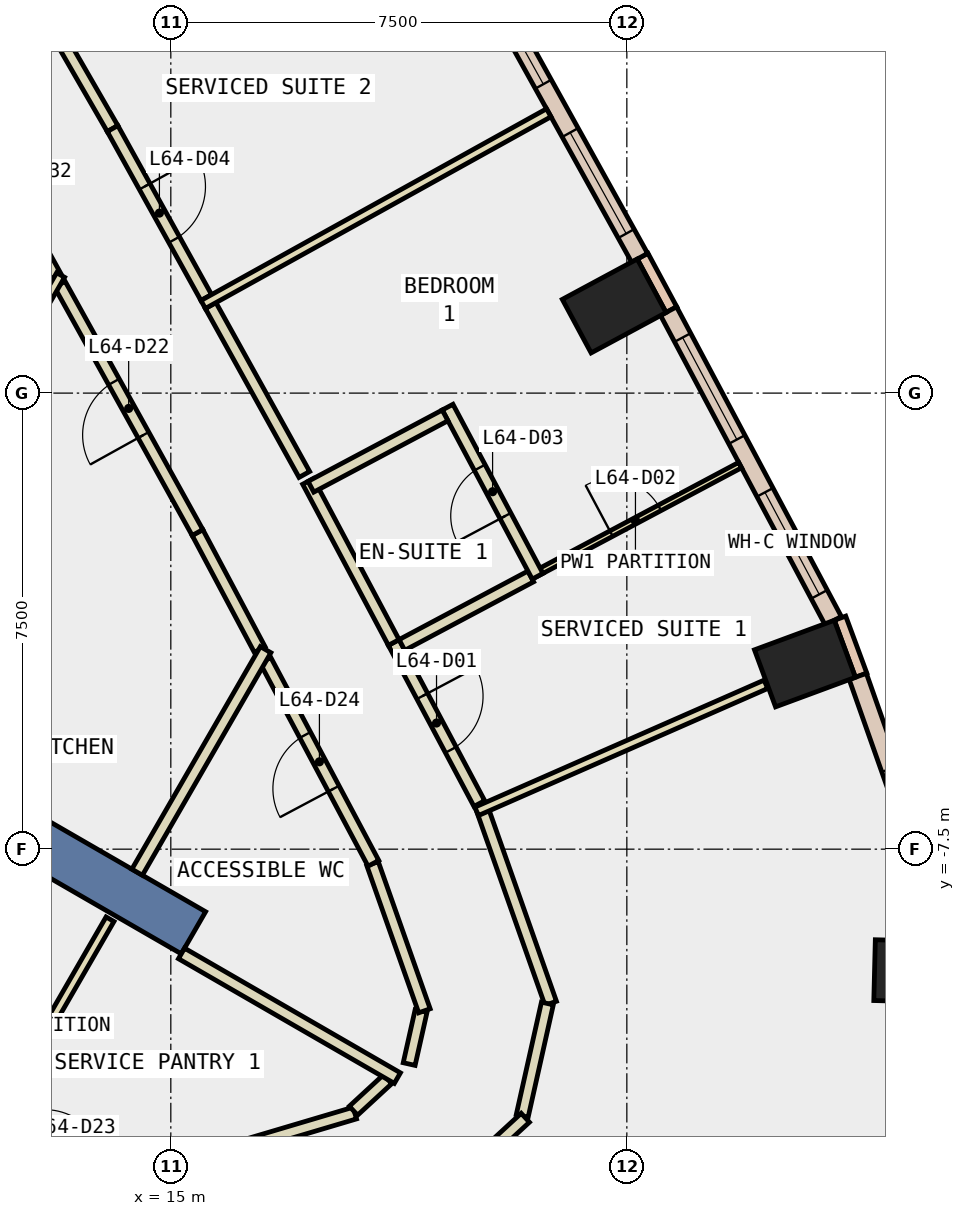
"""IFC4 building model, lengths in metres.
Left out: names, types, materials, properties, quantities, classifications, styles, units other than length and angle.
Written with IfcOpenShell. Run it as: python <this file> out.ifc"""

import sys

from ifc_helpers import new_model, si_unit, direction, frame, frame_2d, origin, origin_2d, place, context, subcontext, project, spatial, rectangle, extrude, element, fill, save


model = new_model("IFC4")
c1 = context("Model", 3, precision=1e-05, world=origin(), true_north=direction((0.0, 1.0)))
c2 = subcontext(c1, "Body", "Model", "MODEL_VIEW")
j1 = project(units=[si_unit("LENGTHUNIT", "METRE"), si_unit("PLANEANGLEUNIT", "RADIAN")], contexts=[c1])
p1 = place(None, origin())
s1 = spatial("IfcSite", under=j1, at=p1, CompositionType="ELEMENT")
p2 = place(p1, origin())
s2 = spatial("IfcBuilding", under=s1, at=p2, CompositionType="ELEMENT")
p3 = place(p2, frame((0.0, 0.0, 277.4)))
s3 = spatial("IfcBuildingStorey", under=s2, at=p3, CompositionType="ELEMENT", Elevation=277.4)
for number, where, z_axis, x_axis in (
    (1, (27.274, -9.507, -0.34), (0.0, 0.0, 1.0), (0.025, 1.0, 0.0)),
    (2, (25.429, -4.448, -0.34), (0.0, 0.0, 1.0), (-0.347, 0.938, 0.0)),
    (3, (22.292, 1.433, -0.34), (0.0, 0.0, 1.0), (-0.474, 0.881, 0.0)),
):
    element("IfcColumn", number, at=place(p3, frame(where, z_axis=z_axis, x_axis=x_axis)), inside=s3, PredefinedType="COLUMN", context=c2, shape_type="SweptSolid", body=[
        extrude(rectangle(XDim=1.0, YDim=1.4, at=origin_2d()), origin(), (0.0, 0.0, 1.0), 3.34),
    ])
p4 = place(p3, frame((7.578, -4.375, -0.34), z_axis=(0.0, 0.0, 1.0), x_axis=(0.866024315419, -0.5000018851, 0.0)))
e4 = element("IfcWall", 4, at=p4, inside=s3, PredefinedType="SHEAR", context=c2, shape_type="SweptSolid", body=[
    extrude(rectangle(XDim=9.0, YDim=0.8, at=frame_2d((4.5, 0.0))), origin(), (0.0, 0.0, 1.0), 3.34),
])
p5 = place(p3, frame((26.353, -4.64, 0.0), z_axis=(0.0, 0.0, 1.0), x_axis=(-0.346892928577, 0.937904737222, 0.0)))
e5 = element("IfcWall", 5, at=p5, inside=s3, PredefinedType="STANDARD", context=c2, shape_type="SweptSolid", body=[
    extrude(rectangle(XDim=1.0, YDim=0.2, at=frame_2d((0.5, 0.0))), origin(), (0.0, 0.0, 1.0), 3.0),
])
p6 = place(p3, frame((23.233, 1.372, 0.0), z_axis=(0.0, 0.0, 1.0), x_axis=(-0.473765014438, 0.880651299377, 0.0)))
e6 = element("IfcWall", 6, at=p6, inside=s3, PredefinedType="STANDARD", context=c2, shape_type="SweptSolid", body=[
    extrude(rectangle(XDim=1.0, YDim=0.2, at=frame_2d((0.5, 0.0))), origin(), (0.0, 0.0, 1.0), 3.0),
])
p7 = place(p3, frame((27.836, -9.021, 0.0), z_axis=(0.0, 0.0, 1.0), x_axis=(-0.332491532378, 0.943106240514, 0.0)))
e7 = element("IfcWall", 7, at=p7, inside=s3, PredefinedType="STANDARD", context=c2, shape_type="SweptSolid", body=[
    extrude(rectangle(XDim=4.625, YDim=0.3, at=frame_2d((2.312, 0.0))), origin(), (0.0, 0.0, 1.0), 3.0),
])
p8 = place(p7, frame((1.613, 0.0, 0.9)))
e8 = element("IfcOpeningElement", 8, at=p8, cuts=e7, PredefinedType="OPENING", context=c2, shape_type="SweptSolid", body=[
    extrude(rectangle(XDim=1.4, YDim=2.0, at=frame_2d((0.7, 1.0))), frame((0.0, 0.16, 0.0), z_axis=(0.0, -1.0, 0.0), x_axis=(1.0, 0.0, 0.0)), (0.0, 0.0, 1.0), 0.32),
])
p9 = place(p3, frame((25.895, -3.744, 0.0), z_axis=(0.0, 0.0, 1.0), x_axis=(-0.469691596427, 0.882830563724, 0.0)))
e9 = element("IfcWall", 9, at=p9, inside=s3, PredefinedType="STANDARD", context=c2, shape_type="SweptSolid", body=[
    extrude(rectangle(XDim=5.768, YDim=0.3, at=frame_2d((2.884, 0.0))), origin(), (0.0, 0.0, 1.0), 3.0),
])
p10 = place(p9, frame((0.492, 0.0, 0.9)))
e10 = element("IfcOpeningElement", 10, at=p10, cuts=e9, PredefinedType="OPENING", context=c2, shape_type="SweptSolid", body=[
    extrude(rectangle(XDim=1.9, YDim=2.0, at=frame_2d((0.95, 1.0))), frame((0.0, 0.16, 0.0), z_axis=(0.0, -1.0, 0.0), x_axis=(1.0, 0.0, 0.0)), (0.0, 0.0, 1.0), 0.32),
])
p11 = place(p9, frame((3.376, 0.0, 0.9)))
e11 = element("IfcOpeningElement", 11, at=p11, cuts=e9, PredefinedType="OPENING", context=c2, shape_type="SweptSolid", body=[
    extrude(rectangle(XDim=1.9, YDim=2.0, at=frame_2d((0.95, 1.0))), frame((0.0, 0.16, 0.0), z_axis=(0.0, -1.0, 0.0), x_axis=(1.0, 0.0, 0.0)), (0.0, 0.0, 1.0), 0.32),
])
p12 = place(p3, frame((22.71, 2.225, 0.0), z_axis=(0.0, 0.0, 1.0), x_axis=(-0.485049005017, 0.874486971162, 0.0)))
e12 = element("IfcWall", 12, at=p12, inside=s3, PredefinedType="STANDARD", context=c2, shape_type="SweptSolid", body=[
    extrude(rectangle(XDim=5.62, YDim=0.3, at=frame_2d((2.81, 0.0))), origin(), (0.0, 0.0, 1.0), 3.0),
])
p13 = place(p12, frame((0.455, 0.0, 0.9)))
e13 = element("IfcOpeningElement", 13, at=p13, cuts=e12, PredefinedType="OPENING", context=c2, shape_type="SweptSolid", body=[
    extrude(rectangle(XDim=1.9, YDim=2.0, at=frame_2d((0.95, 1.0))), frame((0.0, 0.16, 0.0), z_axis=(0.0, -1.0, 0.0), x_axis=(1.0, 0.0, 0.0)), (0.0, 0.0, 1.0), 0.32),
])
p14 = place(p12, frame((3.265, 0.0, 0.9)))
e14 = element("IfcOpeningElement", 14, at=p14, cuts=e12, PredefinedType="OPENING", context=c2, shape_type="SweptSolid", body=[
    extrude(rectangle(XDim=1.9, YDim=2.0, at=frame_2d((0.95, 1.0))), frame((0.0, 0.16, 0.0), z_axis=(0.0, -1.0, 0.0), x_axis=(1.0, 0.0, 0.0)), (0.0, 0.0, 1.0), 0.32),
])
p15 = place(p3, frame((13.102, 1.921, 0.0), z_axis=(0.0, 0.0, 1.0), x_axis=(-0.485065409582, 0.874477871891, 0.0)))
e15 = element("IfcWall", 15, at=p15, inside=s3, PredefinedType="PARTITIONING", context=c2, shape_type="SweptSolid", body=[
    extrude(rectangle(XDim=1.651, YDim=0.2, at=frame_2d((0.826, 0.0))), origin(), (0.0, 0.0, 1.0), 3.0),
])
p16 = place(p15, frame((0.325, 0.0, 0.0)))
e16 = element("IfcOpeningElement", 16, at=p16, cuts=e15, PredefinedType="OPENING", context=c2, shape_type="SweptSolid", body=[
    extrude(rectangle(XDim=1.0, YDim=2.1, at=frame_2d((0.5, 1.05))), frame((0.0, 0.11, 0.0), z_axis=(0.0, -1.0, 0.0), x_axis=(1.0, 0.0, 0.0)), (0.0, 0.0, 1.0), 0.22),
])
p17 = place(p3, frame((16.462, -4.217, 0.0), z_axis=(0.0, 0.0, 1.0), x_axis=(-0.469436447461, 0.882966263113, 0.0)))
e17 = element("IfcWall", 17, at=p17, inside=s3, PredefinedType="PARTITIONING", context=c2, shape_type="SweptSolid", body=[
    extrude(rectangle(XDim=2.179, YDim=0.2, at=frame_2d((1.09, 0.0))), origin(), (0.0, 0.0, 1.0), 3.0),
])
p18 = place(p3, frame((15.439, -2.293, 0.0), z_axis=(0.0, 0.0, 1.0), x_axis=(-0.485079003918, 0.874470331091, 0.0)))
e18 = element("IfcWall", 18, at=p18, inside=s3, PredefinedType="PARTITIONING", context=c2, shape_type="SweptSolid", body=[
    extrude(rectangle(XDim=4.669, YDim=0.2, at=frame_2d((2.334, 0.0))), origin(), (0.0, 0.0, 1.0), 3.0),
])
p19 = place(p18, frame((1.834, 0.0, 0.0)))
e19 = element("IfcOpeningElement", 19, at=p19, cuts=e18, PredefinedType="OPENING", context=c2, shape_type="SweptSolid", body=[
    extrude(rectangle(XDim=1.0, YDim=2.1, at=frame_2d((0.5, 1.05))), frame((0.0, 0.11, 0.0), z_axis=(0.0, -1.0, 0.0), x_axis=(1.0, 0.0, 0.0)), (0.0, 0.0, 1.0), 0.22),
])
p20 = place(p3, frame((15.177, -12.686, 0.0), z_axis=(0.0, 0.0, 1.0), x_axis=(0.958629704259, 0.284656090947, 0.0)))
e20 = element("IfcWall", 20, at=p20, inside=s3, PredefinedType="PARTITIONING", context=c2, shape_type="SweptSolid", body=[
    extrude(rectangle(XDim=2.972, YDim=0.2, at=frame_2d((1.486, 0.0))), origin(), (0.0, 0.0, 1.0), 3.0),
])
p21 = place(p3, frame((18.004, -11.801, 0.0), z_axis=(0.0, 0.0, 1.0), x_axis=(0.735268601872, 0.677775835436, 0.0)))
e21 = element("IfcWall", 21, at=p21, inside=s3, PredefinedType="PARTITIONING", context=c2, shape_type="SweptSolid", body=[
    extrude(rectangle(XDim=0.764, YDim=0.2, at=frame_2d((0.382, 0.0))), origin(), (0.0, 0.0, 1.0), 3.0),
])
p22 = place(p3, frame((18.92, -11.034, 0.0), z_axis=(0.0, 0.0, 1.0), x_axis=(0.219096654714, 0.975703159723, 0.0)))
e22 = element("IfcWall", 22, at=p22, inside=s3, PredefinedType="PARTITIONING", context=c2, shape_type="SweptSolid", body=[
    extrude(rectangle(XDim=0.895, YDim=0.2, at=frame_2d((0.447, 0.0))), origin(), (0.0, 0.0, 1.0), 3.0),
])
p23 = place(p3, frame((19.171, -10.158, 0.0), z_axis=(0.0, 0.0, 1.0), x_axis=(-0.332486504777, 0.943108012977, 0.0)))
e23 = element("IfcWall", 23, at=p23, inside=s3, PredefinedType="PARTITIONING", context=c2, shape_type="SweptSolid", body=[
    extrude(rectangle(XDim=2.565, YDim=0.2, at=frame_2d((1.282, 0.0))), origin(), (0.0, 0.0, 1.0), 3.0),
])
p24 = place(p3, frame((18.332, -7.733, 0.0), z_axis=(0.0, 0.0, 1.0), x_axis=(-0.469639737924, 0.882858152006, 0.0)))
e24 = element("IfcWall", 24, at=p24, inside=s3, PredefinedType="PARTITIONING", context=c2, shape_type="SweptSolid", body=[
    extrude(rectangle(XDim=3.782, YDim=0.2, at=frame_2d((1.891, 0.0))), origin(), (0.0, 0.0, 1.0), 3.0),
])
p25 = place(p24, frame((1.391, 0.0, 0.0)))
e25 = element("IfcOpeningElement", 25, at=p25, cuts=e24, PredefinedType="OPENING", context=c2, shape_type="SweptSolid", body=[
    extrude(rectangle(XDim=1.0, YDim=2.1, at=frame_2d((0.5, 1.05))), frame((0.0, 0.11, 0.0), z_axis=(0.0, -1.0, 0.0), x_axis=(1.0, 0.0, 0.0)), (0.0, 0.0, 1.0), 0.22),
])
p26 = place(p3, frame((20.113, -6.814, 0.0), z_axis=(0.0, 0.0, 1.0), x_axis=(0.332352648366, -0.943155192492, 0.0)))
e26 = element("IfcWall", 26, at=p26, inside=s3, PredefinedType="PARTITIONING", context=c2, shape_type="SweptSolid", body=[
    extrude(rectangle(XDim=3.415, YDim=0.2, at=frame_2d((1.708, 0.0))), origin(), (0.0, 0.0, 1.0), 3.0),
])
p27 = place(p3, frame((21.193, -10.038, 0.0), z_axis=(0.0, 0.0, 1.0), x_axis=(-0.218540107266, -0.975827967173, 0.0)))
e27 = element("IfcWall", 27, at=p27, inside=s3, PredefinedType="PARTITIONING", context=c2, shape_type="SweptSolid", body=[
    extrude(rectangle(XDim=1.895, YDim=0.2, at=frame_2d((0.947, 0.0))), origin(), (0.0, 0.0, 1.0), 3.0),
])
p28 = place(p3, frame((20.83, -11.917, 0.0), z_axis=(0.0, 0.0, 1.0), x_axis=(-0.735547704352, -0.67747293276, 0.0)))
e28 = element("IfcWall", 28, at=p28, inside=s3, PredefinedType="PARTITIONING", context=c2, shape_type="SweptSolid", body=[
    extrude(rectangle(XDim=2.463, YDim=0.2, at=frame_2d((1.232, 0.0))), origin(), (0.0, 0.0, 1.0), 3.0),
])
p29 = place(p3, frame((18.666, -4.101, 0.0), z_axis=(0.0, 0.0, 1.0), x_axis=(0.469341661158, -0.883016650523, 0.0)))
e29 = element("IfcWall", 29, at=p29, inside=s3, PredefinedType="PARTITIONING", context=c2, shape_type="SweptSolid", body=[
    extrude(rectangle(XDim=3.0, YDim=0.2, at=frame_2d((1.5, 0.0))), origin(), (0.0, 0.0, 1.0), 3.0),
])
p30 = place(p29, frame((1.0, 0.0, 0.0)))
e30 = element("IfcOpeningElement", 30, at=p30, cuts=e29, PredefinedType="OPENING", context=c2, shape_type="SweptSolid", body=[
    extrude(rectangle(XDim=1.0, YDim=2.1, at=frame_2d((0.5, 1.05))), frame((0.0, 0.11, 0.0), z_axis=(0.0, -1.0, 0.0), x_axis=(1.0, 0.0, 0.0)), (0.0, 0.0, 1.0), 0.22),
])
p31 = place(p3, frame((15.655, 1.44, 0.0), z_axis=(0.0, 0.0, 1.0), x_axis=(0.485107756493, -0.87445438108, 0.0)))
e31 = element("IfcWall", 31, at=p31, inside=s3, PredefinedType="PARTITIONING", context=c2, shape_type="SweptSolid", body=[
    extrude(rectangle(XDim=3.177, YDim=0.2, at=frame_2d((1.588, 0.0))), origin(), (0.0, 0.0, 1.0), 3.0),
])
p32 = place(p3, frame((17.257, -1.452, 0.0), z_axis=(0.0, 0.0, 1.0), x_axis=(0.469561695117, -0.882899662747, 0.0)))
e32 = element("IfcWall", 32, at=p32, inside=s3, PredefinedType="PARTITIONING", context=c2, shape_type="SweptSolid", body=[
    extrude(rectangle(XDim=3.0, YDim=0.2, at=frame_2d((1.5, 0.0))), origin(), (0.0, 0.0, 1.0), 3.0),
])
p33 = place(p3, frame((12.492, 7.035, 0.0), z_axis=(0.0, 0.0, 1.0), x_axis=(0.49999285859, -0.86602952684, 0.0)))
e33 = element("IfcWall", 33, at=p33, inside=s3, PredefinedType="PARTITIONING", context=c2, shape_type="SweptSolid", body=[
    extrude(rectangle(XDim=3.1, YDim=0.2, at=frame_2d((1.55, 0.0))), origin(), (0.0, 0.0, 1.0), 3.0),
])
p34 = place(p3, frame((14.042, 4.35, 0.0), z_axis=(0.0, 0.0, 1.0), x_axis=(0.484944791944, -0.874544766588, 0.0)))
e34 = element("IfcWall", 34, at=p34, inside=s3, PredefinedType="PARTITIONING", context=c2, shape_type="SweptSolid", body=[
    extrude(rectangle(XDim=3.178, YDim=0.2, at=frame_2d((1.589, 0.0))), origin(), (0.0, 0.0, 1.0), 3.0),
])
p35 = place(p34, frame((1.089, 0.0, 0.0)))
e35 = element("IfcOpeningElement", 35, at=p35, cuts=e34, PredefinedType="OPENING", context=c2, shape_type="SweptSolid", body=[
    extrude(rectangle(XDim=1.0, YDim=2.1, at=frame_2d((0.5, 1.05))), frame((0.0, 0.11, 0.0), z_axis=(0.0, -1.0, 0.0), x_axis=(1.0, 0.0, 0.0)), (0.0, 0.0, 1.0), 0.22),
])
p36 = place(p3, frame((14.0, -8.652, 0.0), z_axis=(0.0, 0.0, 1.0), x_axis=(-0.500067562424, -0.865986393087, 0.0)))
e36 = element("IfcWall", 36, at=p36, inside=s3, PredefinedType="PARTITIONING", context=c2, shape_type="SweptSolid", body=[
    extrude(rectangle(XDim=4.919, YDim=0.15, at=frame_2d((2.459, 0.0))), origin(), (0.0, 0.0, 1.0), 3.0),
])
p37 = place(p3, frame((16.559, -4.219, 0.0), z_axis=(0.0, 0.0, 1.0), x_axis=(-0.499997491977, -0.866026851788, 0.0)))
e37 = element("IfcWall", 37, at=p37, inside=s3, PredefinedType="PARTITIONING", context=c2, shape_type="SweptSolid", body=[
    extrude(rectangle(XDim=4.226, YDim=0.2, at=frame_2d((2.113, 0.0))), origin(), (0.0, 0.0, 1.0), 3.0),
])
p38 = place(p3, frame((15.176, -9.215, 0.0), z_axis=(0.0, 0.0, 1.0), x_axis=(0.866006068523, -0.500033488159, 0.0)))
e38 = element("IfcWall", 38, at=p38, inside=s3, PredefinedType="PARTITIONING", context=c2, shape_type="SweptSolid", body=[
    extrude(rectangle(XDim=4.099, YDim=0.2, at=frame_2d((2.05, 0.0))), origin(), (0.0, 0.0, 1.0), 3.0),
])
p39 = place(p3, frame((20.03, -6.878, 0.0), z_axis=(0.0, 0.0, 1.0), x_axis=(0.915616185053, 0.402053481104, 0.0)))
e39 = element("IfcWall", 39, at=p39, inside=s3, PredefinedType="PARTITIONING", context=c2, shape_type="SweptSolid", body=[
    extrude(rectangle(XDim=5.196, YDim=0.15, at=frame_2d((2.598, 0.0))), origin(), (0.0, 0.0, 1.0), 3.0),
])
p40 = place(p3, frame((20.92, -3.015, 0.0), z_axis=(0.0, 0.0, 1.0), x_axis=(0.882939758336, 0.469486297083, 0.0)))
e40 = element("IfcWall", 40, at=p40, inside=s3, PredefinedType="PARTITIONING", context=c2, shape_type="SweptSolid", body=[
    extrude(rectangle(XDim=3.9, YDim=0.1, at=frame_2d((1.95, 0.0))), origin(), (0.0, 0.0, 1.0), 3.0),
])
p41 = place(p40, frame((1.5, 0.0, 0.0)))
e41 = element("IfcOpeningElement", 41, at=p41, cuts=e40, PredefinedType="OPENING", context=c2, shape_type="SweptSolid", body=[
    extrude(rectangle(XDim=0.9, YDim=2.1, at=frame_2d((0.45, 1.05))), frame((0.0, 0.06, 0.0), z_axis=(0.0, -1.0, 0.0), x_axis=(1.0, 0.0, 0.0)), (0.0, 0.0, 1.0), 0.12),
])
p42 = place(p3, frame((18.801, -4.142, 0.0), z_axis=(0.0, 0.0, 1.0), x_axis=(0.882850852072, 0.469653460539, 0.0)))
e42 = element("IfcWall", 42, at=p42, inside=s3, PredefinedType="PARTITIONING", context=c2, shape_type="SweptSolid", body=[
    extrude(rectangle(XDim=2.4, YDim=0.2, at=frame_2d((1.2, 0.0))), origin(), (0.0, 0.0, 1.0), 3.0),
])
p43 = place(p3, frame((21.032, -3.012, 0.0), z_axis=(0.0, 0.0, 1.0), x_axis=(-0.469791613002, 0.882777344721, 0.0)))
e43 = element("IfcWall", 43, at=p43, inside=s3, PredefinedType="PARTITIONING", context=c2, shape_type="SweptSolid", body=[
    extrude(rectangle(XDim=3.15, YDim=0.2, at=frame_2d((1.575, 0.0))), origin(), (0.0, 0.0, 1.0), 3.0),
])
p44 = place(p43, frame((1.125, 0.0, 0.0)))
e44 = element("IfcOpeningElement", 44, at=p44, cuts=e43, PredefinedType="OPENING", context=c2, shape_type="SweptSolid", body=[
    extrude(rectangle(XDim=0.9, YDim=2.1, at=frame_2d((0.45, 1.05))), frame((0.0, 0.11, 0.0), z_axis=(0.0, -1.0, 0.0), x_axis=(1.0, 0.0, 0.0)), (0.0, 0.0, 1.0), 0.22),
])
p45 = place(p3, frame((19.511, -0.367, 0.0), z_axis=(0.0, 0.0, 1.0), x_axis=(-0.883014523832, -0.46934566228, 0.0)))
e45 = element("IfcWall", 45, at=p45, inside=s3, PredefinedType="PARTITIONING", context=c2, shape_type="SweptSolid", body=[
    extrude(rectangle(XDim=2.5, YDim=0.2, at=frame_2d((1.25, 0.0))), origin(), (0.0, 0.0, 1.0), 3.0),
])
p46 = place(p3, frame((15.532, 1.457, 0.0), z_axis=(0.0, 0.0, 1.0), x_axis=(0.874467143452, 0.485084750351, 0.0)))
e46 = element("IfcWall", 46, at=p46, inside=s3, PredefinedType="PARTITIONING", context=c2, shape_type="SweptSolid", body=[
    extrude(rectangle(XDim=6.5, YDim=0.15, at=frame_2d((3.25, 0.0))), origin(), (0.0, 0.0, 1.0), 3.0),
])
p47 = place(p3, frame((9.25, -4.879, 0.0), z_axis=(0.0, 0.0, 1.0), x_axis=(0.499999725187, 0.866025562448, 0.0)))
e47 = element("IfcWall", 47, at=p47, inside=s3, PredefinedType="PARTITIONING", context=c2, shape_type="SweptSolid", body=[
    extrude(rectangle(XDim=7.876, YDim=0.15, at=frame_2d((3.938, 0.0))), origin(), (0.0, 0.0, 1.0), 3.0),
])
p48 = place(p10, origin())
e48 = element("IfcWindow", 48, at=p48, inside=s3, PartitioningType="SINGLE_PANEL", PredefinedType="WINDOW", context=c2, shape_type="SweptSolid", body=[
    extrude(rectangle(XDim=1.9, YDim=2.0, at=frame_2d((0.95, 1.0))), frame((0.0, 0.03, 0.0), z_axis=(0.0, -1.0, 0.0), x_axis=(1.0, 0.0, 0.0)), (0.0, 0.0, 1.0), 0.06),
])
fill(e10, e48)
p49 = place(p11, origin())
e49 = element("IfcWindow", 49, at=p49, inside=s3, PartitioningType="SINGLE_PANEL", PredefinedType="WINDOW", context=c2, shape_type="SweptSolid", body=[
    extrude(rectangle(XDim=1.9, YDim=2.0, at=frame_2d((0.95, 1.0))), frame((0.0, 0.03, 0.0), z_axis=(0.0, -1.0, 0.0), x_axis=(1.0, 0.0, 0.0)), (0.0, 0.0, 1.0), 0.06),
])
fill(e11, e49)
p50 = place(p13, origin())
e50 = element("IfcWindow", 50, at=p50, inside=s3, PartitioningType="SINGLE_PANEL", PredefinedType="WINDOW", context=c2, shape_type="SweptSolid", body=[
    extrude(rectangle(XDim=1.9, YDim=2.0, at=frame_2d((0.95, 1.0))), frame((0.0, 0.03, 0.0), z_axis=(0.0, -1.0, 0.0), x_axis=(1.0, 0.0, 0.0)), (0.0, 0.0, 1.0), 0.06),
])
fill(e13, e50)
p51 = place(p14, origin())
e51 = element("IfcWindow", 51, at=p51, inside=s3, PartitioningType="SINGLE_PANEL", PredefinedType="WINDOW", context=c2, shape_type="SweptSolid", body=[
    extrude(rectangle(XDim=1.9, YDim=2.0, at=frame_2d((0.95, 1.0))), frame((0.0, 0.03, 0.0), z_axis=(0.0, -1.0, 0.0), x_axis=(1.0, 0.0, 0.0)), (0.0, 0.0, 1.0), 0.06),
])
fill(e14, e51)
p52 = place(p30, origin())
e52 = element("IfcDoor", 52, at=p52, inside=s3, OperationType="SINGLE_SWING_LEFT", PredefinedType="DOOR", context=c2, shape_type="SweptSolid", body=[
    extrude(rectangle(XDim=1.0, YDim=2.1, at=frame_2d((0.5, 1.05))), frame((0.0, 0.025, 0.0), z_axis=(0.0, -1.0, 0.0), x_axis=(1.0, 0.0, 0.0)), (0.0, 0.0, 1.0), 0.05),
])
fill(e30, e52)
p53 = place(p41, origin())
e53 = element("IfcDoor", 53, at=p53, inside=s3, OperationType="SINGLE_SWING_LEFT", PredefinedType="DOOR", context=c2, shape_type="SweptSolid", body=[
    extrude(rectangle(XDim=0.9, YDim=2.1, at=frame_2d((0.45, 1.05))), frame((0.0, 0.025, 0.0), z_axis=(0.0, -1.0, 0.0), x_axis=(1.0, 0.0, 0.0)), (0.0, 0.0, 1.0), 0.05),
])
fill(e41, e53)
p54 = place(p44, origin())
e54 = element("IfcDoor", 54, at=p54, inside=s3, OperationType="SINGLE_SWING_LEFT", PredefinedType="DOOR", context=c2, shape_type="SweptSolid", body=[
    extrude(rectangle(XDim=0.9, YDim=2.1, at=frame_2d((0.45, 1.05))), frame((0.0, 0.025, 0.0), z_axis=(0.0, -1.0, 0.0), x_axis=(1.0, 0.0, 0.0)), (0.0, 0.0, 1.0), 0.05),
])
fill(e44, e54)
p55 = place(p35, origin())
e55 = element("IfcDoor", 55, at=p55, inside=s3, OperationType="SINGLE_SWING_LEFT", PredefinedType="DOOR", context=c2, shape_type="SweptSolid", body=[
    extrude(rectangle(XDim=1.0, YDim=2.1, at=frame_2d((0.5, 1.05))), frame((0.0, 0.025, 0.0), z_axis=(0.0, -1.0, 0.0), x_axis=(1.0, 0.0, 0.0)), (0.0, 0.0, 1.0), 0.05),
])
fill(e35, e55)
p56 = place(p19, origin())
e56 = element("IfcDoor", 56, at=p56, inside=s3, OperationType="SINGLE_SWING_LEFT", PredefinedType="DOOR", context=c2, shape_type="SweptSolid", body=[
    extrude(rectangle(XDim=1.0, YDim=2.1, at=frame_2d((0.5, 1.05))), frame((0.0, 0.025, 0.0), z_axis=(0.0, -1.0, 0.0), x_axis=(1.0, 0.0, 0.0)), (0.0, 0.0, 1.0), 0.05),
])
fill(e19, e56)
p57 = place(p25, origin())
e57 = element("IfcDoor", 57, at=p57, inside=s3, OperationType="SINGLE_SWING_RIGHT", PredefinedType="DOOR", context=c2, shape_type="SweptSolid", body=[
    extrude(rectangle(XDim=1.0, YDim=2.1, at=frame_2d((0.5, 1.05))), frame((0.0, 0.025, 0.0), z_axis=(0.0, -1.0, 0.0), x_axis=(1.0, 0.0, 0.0)), (0.0, 0.0, 1.0), 0.05),
])
fill(e25, e57)
save(model, sys.argv[1])
